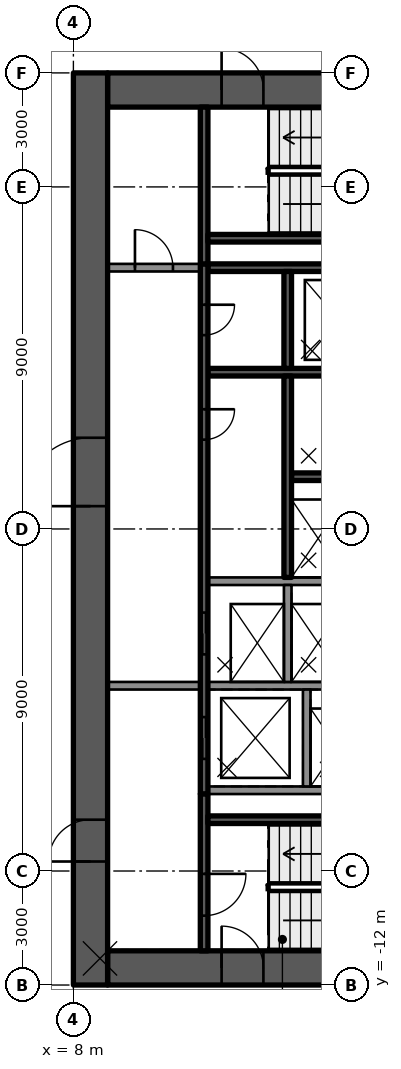
"""IFC4 building model, lengths in metres.
Left out: names, types, materials, properties, quantities, classifications, styles, units other than length and angle.
Written with IfcOpenShell. Run it as: python <this file> out.ifc"""

import sys

from ifc_helpers import new_model, si_unit, direction, frame, frame_2d, origin, place, context, subcontext, project, spatial, rectangle, extrude, element, fill, save


model = new_model("IFC4")
c1 = context("Model", 3, precision=1e-05, world=origin(), true_north=direction((0.0, 1.0)))
c2 = subcontext(c1, "Body", "Model", "MODEL_VIEW")
j1 = project(units=[si_unit("LENGTHUNIT", "METRE"), si_unit("PLANEANGLEUNIT", "RADIAN")], contexts=[c1])
p1 = place(None, origin())
s1 = spatial("IfcSite", under=j1, at=p1, CompositionType="ELEMENT")
p2 = place(p1, origin())
s2 = spatial("IfcBuilding", under=s1, at=p2, CompositionType="ELEMENT")
p3 = place(p2, frame((0.0, 0.0, 199.1)))
s3 = spatial("IfcBuildingStorey", under=s2, at=p3, CompositionType="ELEMENT", Elevation=199.1)
p4 = place(p3, frame((8.9, 11.55, 0.0), z_axis=(0.0, 0.0, 1.0), x_axis=(1.0, 0.0, 0.0)))
e1 = element("IfcWall", 1, at=p4, inside=s3, PredefinedType="SHEAR", context=c2, shape_type="SweptSolid", body=[
    extrude(rectangle(XDim=9.2, YDim=0.9, at=frame_2d((4.6, 0.0))), origin(), (0.0, 0.0, 1.0), 3.5),
])
p5 = place(p4, frame((3.0, 0.0, 0.0)))
e2 = element("IfcOpeningElement", 2, at=p5, cuts=e1, PredefinedType="OPENING", context=c2, shape_type="SweptSolid", body=[
    extrude(rectangle(XDim=1.1, YDim=2.1, at=frame_2d((0.55, 1.05))), frame((0.0, 0.46, 0.0), z_axis=(0.0, -1.0, 0.0), x_axis=(1.0, 0.0, 0.0)), (0.0, 0.0, 1.0), 0.92),
])
p6 = place(p3, frame((8.9, -11.55, 0.0), z_axis=(0.0, 0.0, 1.0), x_axis=(1.0, 0.0, 0.0)))
e3 = element("IfcWall", 3, at=p6, inside=s3, PredefinedType="SHEAR", context=c2, shape_type="SweptSolid", body=[
    extrude(rectangle(XDim=9.2, YDim=0.9, at=frame_2d((4.6, 0.0))), origin(), (0.0, 0.0, 1.0), 3.5),
])
p7 = place(p6, frame((3.0, 0.0, 0.0)))
e4 = element("IfcOpeningElement", 4, at=p7, cuts=e3, PredefinedType="OPENING", context=c2, shape_type="SweptSolid", body=[
    extrude(rectangle(XDim=1.1, YDim=2.1, at=frame_2d((0.55, 1.05))), frame((0.0, 0.46, 0.0), z_axis=(0.0, -1.0, 0.0), x_axis=(1.0, 0.0, 0.0)), (0.0, 0.0, 1.0), 0.92),
])
p8 = place(p3, frame((8.45, -12.0, 0.0), z_axis=(0.0, 0.0, 1.0), x_axis=(0.0, 1.0, 0.0)))
e5 = element("IfcWall", 5, at=p8, inside=s3, PredefinedType="SHEAR", context=c2, shape_type="SweptSolid", body=[
    extrude(rectangle(XDim=24.0, YDim=0.9, at=frame_2d((12.0, 0.0))), origin(), (0.0, 0.0, 1.0), 3.5),
])
p9 = place(p8, frame((12.6, 0.0, 0.0)))
e6 = element("IfcOpeningElement", 6, at=p9, cuts=e5, PredefinedType="OPENING", context=c2, shape_type="SweptSolid", body=[
    extrude(rectangle(XDim=1.8, YDim=2.1, at=frame_2d((0.9, 1.05))), frame((0.0, 0.46, 0.0), z_axis=(0.0, -1.0, 0.0), x_axis=(1.0, 0.0, 0.0)), (0.0, 0.0, 1.0), 0.92),
])
p10 = place(p8, frame((3.25, 0.0, 0.0)))
e7 = element("IfcOpeningElement", 7, at=p10, cuts=e5, PredefinedType="OPENING", context=c2, shape_type="SweptSolid", body=[
    extrude(rectangle(XDim=1.1, YDim=2.1, at=frame_2d((0.55, 1.05))), frame((0.0, 0.46, 0.0), z_axis=(0.0, -1.0, 0.0), x_axis=(1.0, 0.0, 0.0)), (0.0, 0.0, 1.0), 0.92),
])
for number, where, z_axis, x_axis in (
    (8, (11.54, -6.875, 0.0), (0.0, 0.0, 1.0), (1.0, 0.0, 0.0)),
    (9, (11.54, 6.875, 0.0), (0.0, 0.0, 1.0), (1.0, 0.0, 0.0)),
):
    element("IfcWall", number, at=place(p3, frame(where, z_axis=z_axis, x_axis=x_axis)), inside=s3, PredefinedType="SOLIDWALL", context=c2, shape_type="SweptSolid", body=[
        extrude(rectangle(XDim=6.56, YDim=0.2, at=frame_2d((3.28, 0.0))), origin(), (0.0, 0.0, 1.0), 3.08),
    ])
p11 = place(p3, frame((11.54, 4.125, 0.0), z_axis=(0.0, 0.0, 1.0), x_axis=(1.0, 0.0, 0.0)))
e10 = element("IfcWall", 10, at=p11, inside=s3, PredefinedType="SOLIDWALL", context=c2, shape_type="SweptSolid", body=[
    extrude(rectangle(XDim=4.7, YDim=0.2, at=frame_2d((2.35, 0.0))), origin(), (0.0, 0.0, 1.0), 3.08),
])
p12 = place(p3, frame((13.74, 1.375, 0.0), z_axis=(0.0, 0.0, 1.0), x_axis=(1.0, 0.0, 0.0)))
e11 = element("IfcWall", 11, at=p12, inside=s3, PredefinedType="SOLIDWALL", context=c2, shape_type="SweptSolid", body=[
    extrude(rectangle(XDim=2.0, YDim=0.2, at=frame_2d((1.0, 0.0))), origin(), (0.0, 0.0, 1.0), 3.08),
])
p13 = place(p3, frame((11.54, -1.375, 0.0), z_axis=(0.0, 0.0, 1.0), x_axis=(1.0, 0.0, 0.0)))
e12 = element("IfcWall", 12, at=p13, inside=s3, PredefinedType="SOLIDWALL", context=c2, shape_type="SweptSolid", body=[
    extrude(rectangle(XDim=4.2, YDim=0.2, at=frame_2d((2.1, 0.0))), origin(), (0.0, 0.0, 1.0), 3.08),
])
p14 = place(p3, frame((11.54, -4.125, 0.0), z_axis=(0.0, 0.0, 1.0), x_axis=(1.0, 0.0, 0.0)))
e13 = element("IfcWall", 13, at=p14, inside=s3, PredefinedType="SOLIDWALL", context=c2, shape_type="SweptSolid", body=[
    extrude(rectangle(XDim=4.7, YDim=0.2, at=frame_2d((2.35, 0.0))), origin(), (0.0, 0.0, 1.0), 3.08),
])
p15 = place(p3, frame((11.44, 6.975, 0.0), z_axis=(0.0, 0.0, 1.0), x_axis=(0.0, -1.0, 0.0)))
e14 = element("IfcWall", 14, at=p15, inside=s3, PredefinedType="SOLIDWALL", context=c2, shape_type="SweptSolid", body=[
    extrude(rectangle(XDim=13.95, YDim=0.2, at=frame_2d((6.975, 0.0))), origin(), (0.0, 0.0, 1.0), 3.08),
])
p16 = place(p15, frame((9.175, 0.0, 0.0)))
e15 = element("IfcOpeningElement", 15, at=p16, cuts=e14, PredefinedType="OPENING", context=c2, shape_type="SweptSolid", body=[
    extrude(rectangle(XDim=1.1, YDim=2.1, at=frame_2d((0.55, 1.05))), frame((0.0, 0.11, 0.0), z_axis=(0.0, -1.0, 0.0), x_axis=(1.0, 0.0, 0.0)), (0.0, 0.0, 1.0), 0.22),
])
p17 = place(p15, frame((11.925, 0.0, 0.0)))
e16 = element("IfcOpeningElement", 16, at=p17, cuts=e14, PredefinedType="OPENING", context=c2, shape_type="SweptSolid", body=[
    extrude(rectangle(XDim=1.1, YDim=2.1, at=frame_2d((0.55, 1.05))), frame((0.0, 0.11, 0.0), z_axis=(0.0, -1.0, 0.0), x_axis=(1.0, 0.0, 0.0)), (0.0, 0.0, 1.0), 0.22),
])
p18 = place(p15, frame((1.075, 0.0, 0.0)))
e17 = element("IfcOpeningElement", 17, at=p18, cuts=e14, PredefinedType="OPENING", context=c2, shape_type="SweptSolid", body=[
    extrude(rectangle(XDim=0.8, YDim=2.1, at=frame_2d((0.4, 1.05))), frame((0.0, 0.11, 0.0), z_axis=(0.0, -1.0, 0.0), x_axis=(1.0, 0.0, 0.0)), (0.0, 0.0, 1.0), 0.22),
])
p19 = place(p15, frame((3.825, 0.0, 0.0)))
e18 = element("IfcOpeningElement", 18, at=p19, cuts=e14, PredefinedType="OPENING", context=c2, shape_type="SweptSolid", body=[
    extrude(rectangle(XDim=0.8, YDim=2.1, at=frame_2d((0.4, 1.05))), frame((0.0, 0.11, 0.0), z_axis=(0.0, -1.0, 0.0), x_axis=(1.0, 0.0, 0.0)), (0.0, 0.0, 1.0), 0.22),
])
p20 = place(p3, frame((13.64, 6.775, 0.0), z_axis=(0.0, 0.0, 1.0), x_axis=(0.0, -1.0, 0.0)))
e19 = element("IfcWall", 19, at=p20, inside=s3, PredefinedType="SOLIDWALL", context=c2, shape_type="SweptSolid", body=[
    extrude(rectangle(XDim=2.55, YDim=0.2, at=frame_2d((1.275, 0.0))), origin(), (0.0, 0.0, 1.0), 3.08),
])
p21 = place(p3, frame((13.64, 4.025, 0.0), z_axis=(0.0, 0.0, 1.0), x_axis=(0.0, -1.0, 0.0)))
e20 = element("IfcWall", 20, at=p21, inside=s3, PredefinedType="SOLIDWALL", context=c2, shape_type="SweptSolid", body=[
    extrude(rectangle(XDim=5.3, YDim=0.2, at=frame_2d((2.65, 0.0))), origin(), (0.0, 0.0, 1.0), 3.08),
])
for number, where, z_axis, x_axis in (
    (21, (13.64, -1.475, 0.0), (0.0, 0.0, 1.0), (0.0, -1.0, 0.0)),
    (22, (14.14, -4.225, 0.0), (0.0, 0.0, 1.0), (0.0, -1.0, 0.0)),
):
    element("IfcWall", number, at=place(p3, frame(where, z_axis=z_axis, x_axis=x_axis)), inside=s3, PredefinedType="SOLIDWALL", context=c2, shape_type="SweptSolid", body=[
        extrude(rectangle(XDim=2.55, YDim=0.2, at=frame_2d((1.275, 0.0))), origin(), (0.0, 0.0, 1.0), 3.08),
    ])
p22 = place(p3, frame((11.44, -6.975, 0.0), z_axis=(0.0, 0.0, 1.0), x_axis=(0.0, -1.0, 0.0)))
e23 = element("IfcWall", 23, at=p22, inside=s3, PredefinedType="SOLIDWALL", context=c2, shape_type="SweptSolid", body=[
    extrude(rectangle(XDim=4.125, YDim=0.2, at=frame_2d((2.062, 0.0))), origin(), (0.0, 0.0, 1.0), 3.08),
])
p23 = place(p22, frame((2.1, 0.0, 0.0)))
e24 = element("IfcOpeningElement", 24, at=p23, cuts=e23, PredefinedType="OPENING", context=c2, shape_type="SweptSolid", body=[
    extrude(rectangle(XDim=1.1, YDim=2.1, at=frame_2d((0.55, 1.05))), frame((0.0, 0.11, 0.0), z_axis=(0.0, -1.0, 0.0), x_axis=(1.0, 0.0, 0.0)), (0.0, 0.0, 1.0), 0.22),
])
p24 = place(p3, frame((11.54, -7.65, 0.0), z_axis=(0.0, 0.0, 1.0), x_axis=(1.0, 0.0, 0.0)))
e25 = element("IfcWall", 25, at=p24, inside=s3, PredefinedType="SOLIDWALL", context=c2, shape_type="SweptSolid", body=[
    extrude(rectangle(XDim=6.56, YDim=0.2, at=frame_2d((3.28, 0.0))), origin(), (0.0, 0.0, 1.0), 3.08),
])
p25 = place(p3, frame((11.44, 11.1, 0.0), z_axis=(0.0, 0.0, 1.0), x_axis=(0.0, -1.0, 0.0)))
e26 = element("IfcWall", 26, at=p25, inside=s3, PredefinedType="SOLIDWALL", context=c2, shape_type="SweptSolid", body=[
    extrude(rectangle(XDim=4.125, YDim=0.2, at=frame_2d((2.062, 0.0))), origin(), (0.0, 0.0, 1.0), 3.08),
])
p26 = place(p3, frame((11.54, 7.65, 0.0), z_axis=(0.0, 0.0, 1.0), x_axis=(1.0, 0.0, 0.0)))
e27 = element("IfcWall", 27, at=p26, inside=s3, PredefinedType="SOLIDWALL", context=c2, shape_type="SweptSolid", body=[
    extrude(rectangle(XDim=6.56, YDim=0.2, at=frame_2d((3.28, 0.0))), origin(), (0.0, 0.0, 1.0), 3.08),
])
p27 = place(p3, frame((8.9, -4.125, 0.0), z_axis=(0.0, 0.0, 1.0), x_axis=(1.0, 0.0, 0.0)))
e28 = element("IfcWall", 28, at=p27, inside=s3, PredefinedType="PARTITIONING", context=c2, shape_type="SweptSolid", body=[
    extrude(rectangle(XDim=2.44, YDim=0.2, at=frame_2d((1.22, 0.0))), origin(), (0.0, 0.0, 1.0), 3.08),
])
p28 = place(p3, frame((8.9, 6.875, 0.0), z_axis=(0.0, 0.0, 1.0), x_axis=(1.0, 0.0, 0.0)))
e29 = element("IfcWall", 29, at=p28, inside=s3, PredefinedType="PARTITIONING", context=c2, shape_type="SweptSolid", body=[
    extrude(rectangle(XDim=2.44, YDim=0.2, at=frame_2d((1.22, 0.0))), origin(), (0.0, 0.0, 1.0), 3.08),
])
p29 = place(p28, frame((0.72, 0.0, 0.0)))
e30 = element("IfcOpeningElement", 30, at=p29, cuts=e29, PredefinedType="OPENING", context=c2, shape_type="SweptSolid", body=[
    extrude(rectangle(XDim=1.0, YDim=2.1, at=frame_2d((0.5, 1.05))), frame((0.0, 0.11, 0.0), z_axis=(0.0, -1.0, 0.0), x_axis=(1.0, 0.0, 0.0)), (0.0, 0.0, 1.0), 0.22),
])
p30 = place(p16, origin())
e31 = element("IfcDoor", 31, at=p30, inside=s3, OperationType="DOUBLE_DOOR_SLIDING", PredefinedType="DOOR", context=c2, shape_type="SweptSolid", body=[
    extrude(rectangle(XDim=1.1, YDim=2.1, at=frame_2d((0.55, 1.05))), frame((0.0, 0.025, 0.0), z_axis=(0.0, -1.0, 0.0), x_axis=(1.0, 0.0, 0.0)), (0.0, 0.0, 1.0), 0.05),
])
fill(e15, e31)
p31 = place(p17, origin())
e32 = element("IfcDoor", 32, at=p31, inside=s3, OperationType="DOUBLE_DOOR_SLIDING", PredefinedType="DOOR", context=c2, shape_type="SweptSolid", body=[
    extrude(rectangle(XDim=1.1, YDim=2.1, at=frame_2d((0.55, 1.05))), frame((0.0, 0.025, 0.0), z_axis=(0.0, -1.0, 0.0), x_axis=(1.0, 0.0, 0.0)), (0.0, 0.0, 1.0), 0.05),
])
fill(e16, e32)
p32 = place(p18, origin())
e33 = element("IfcDoor", 33, at=p32, inside=s3, OperationType="SINGLE_SWING_LEFT", PredefinedType="DOOR", context=c2, shape_type="SweptSolid", body=[
    extrude(rectangle(XDim=0.8, YDim=2.1, at=frame_2d((0.4, 1.05))), frame((0.0, 0.025, 0.0), z_axis=(0.0, -1.0, 0.0), x_axis=(1.0, 0.0, 0.0)), (0.0, 0.0, 1.0), 0.05),
])
fill(e17, e33)
p33 = place(p19, origin())
e34 = element("IfcDoor", 34, at=p33, inside=s3, OperationType="SINGLE_SWING_LEFT", PredefinedType="DOOR", context=c2, shape_type="SweptSolid", body=[
    extrude(rectangle(XDim=0.8, YDim=2.1, at=frame_2d((0.4, 1.05))), frame((0.0, 0.025, 0.0), z_axis=(0.0, -1.0, 0.0), x_axis=(1.0, 0.0, 0.0)), (0.0, 0.0, 1.0), 0.05),
])
fill(e18, e34)
p34 = place(p9, origin())
e35 = element("IfcDoor", 35, at=p34, inside=s3, OperationType="SINGLE_SWING_RIGHT", PredefinedType="DOOR", context=c2, shape_type="SweptSolid", body=[
    extrude(rectangle(XDim=1.8, YDim=2.1, at=frame_2d((0.9, 1.05))), frame((0.0, 0.025, 0.0), z_axis=(0.0, -1.0, 0.0), x_axis=(1.0, 0.0, 0.0)), (0.0, 0.0, 1.0), 0.05),
])
fill(e6, e35)
p35 = place(p10, origin())
e36 = element("IfcDoor", 36, at=p35, inside=s3, OperationType="SINGLE_SWING_LEFT", PredefinedType="DOOR", context=c2, shape_type="SweptSolid", body=[
    extrude(rectangle(XDim=1.1, YDim=2.1, at=frame_2d((0.55, 1.05))), frame((0.0, 0.025, 0.0), z_axis=(0.0, -1.0, 0.0), x_axis=(1.0, 0.0, 0.0)), (0.0, 0.0, 1.0), 0.05),
])
fill(e7, e36)
p36 = place(p7, origin())
e37 = element("IfcDoor", 37, at=p36, inside=s3, OperationType="SINGLE_SWING_LEFT", PredefinedType="DOOR", context=c2, shape_type="SweptSolid", body=[
    extrude(rectangle(XDim=1.1, YDim=2.1, at=frame_2d((0.55, 1.05))), frame((0.0, 0.025, 0.0), z_axis=(0.0, -1.0, 0.0), x_axis=(1.0, 0.0, 0.0)), (0.0, 0.0, 1.0), 0.05),
])
fill(e4, e37)
p37 = place(p5, origin())
e38 = element("IfcDoor", 38, at=p37, inside=s3, OperationType="SINGLE_SWING_LEFT", PredefinedType="DOOR", context=c2, shape_type="SweptSolid", body=[
    extrude(rectangle(XDim=1.1, YDim=2.1, at=frame_2d((0.55, 1.05))), frame((0.0, 0.025, 0.0), z_axis=(0.0, -1.0, 0.0), x_axis=(1.0, 0.0, 0.0)), (0.0, 0.0, 1.0), 0.05),
])
fill(e2, e38)
p38 = place(p23, origin())
e39 = element("IfcDoor", 39, at=p38, inside=s3, OperationType="SINGLE_SWING_RIGHT", PredefinedType="DOOR", context=c2, shape_type="SweptSolid", body=[
    extrude(rectangle(XDim=1.1, YDim=2.1, at=frame_2d((0.55, 1.05))), frame((0.0, 0.025, 0.0), z_axis=(0.0, -1.0, 0.0), x_axis=(1.0, 0.0, 0.0)), (0.0, 0.0, 1.0), 0.05),
])
fill(e24, e39)
p39 = place(p29, origin())
e40 = element("IfcDoor", 40, at=p39, inside=s3, OperationType="SINGLE_SWING_RIGHT", PredefinedType="DOOR", context=c2, shape_type="SweptSolid", body=[
    extrude(rectangle(XDim=1.0, YDim=2.1, at=frame_2d((0.5, 1.05))), frame((0.0, 0.025, 0.0), z_axis=(0.0, -1.0, 0.0), x_axis=(1.0, 0.0, 0.0)), (0.0, 0.0, 1.0), 0.05),
])
fill(e30, e40)
save(model, sys.argv[1])
